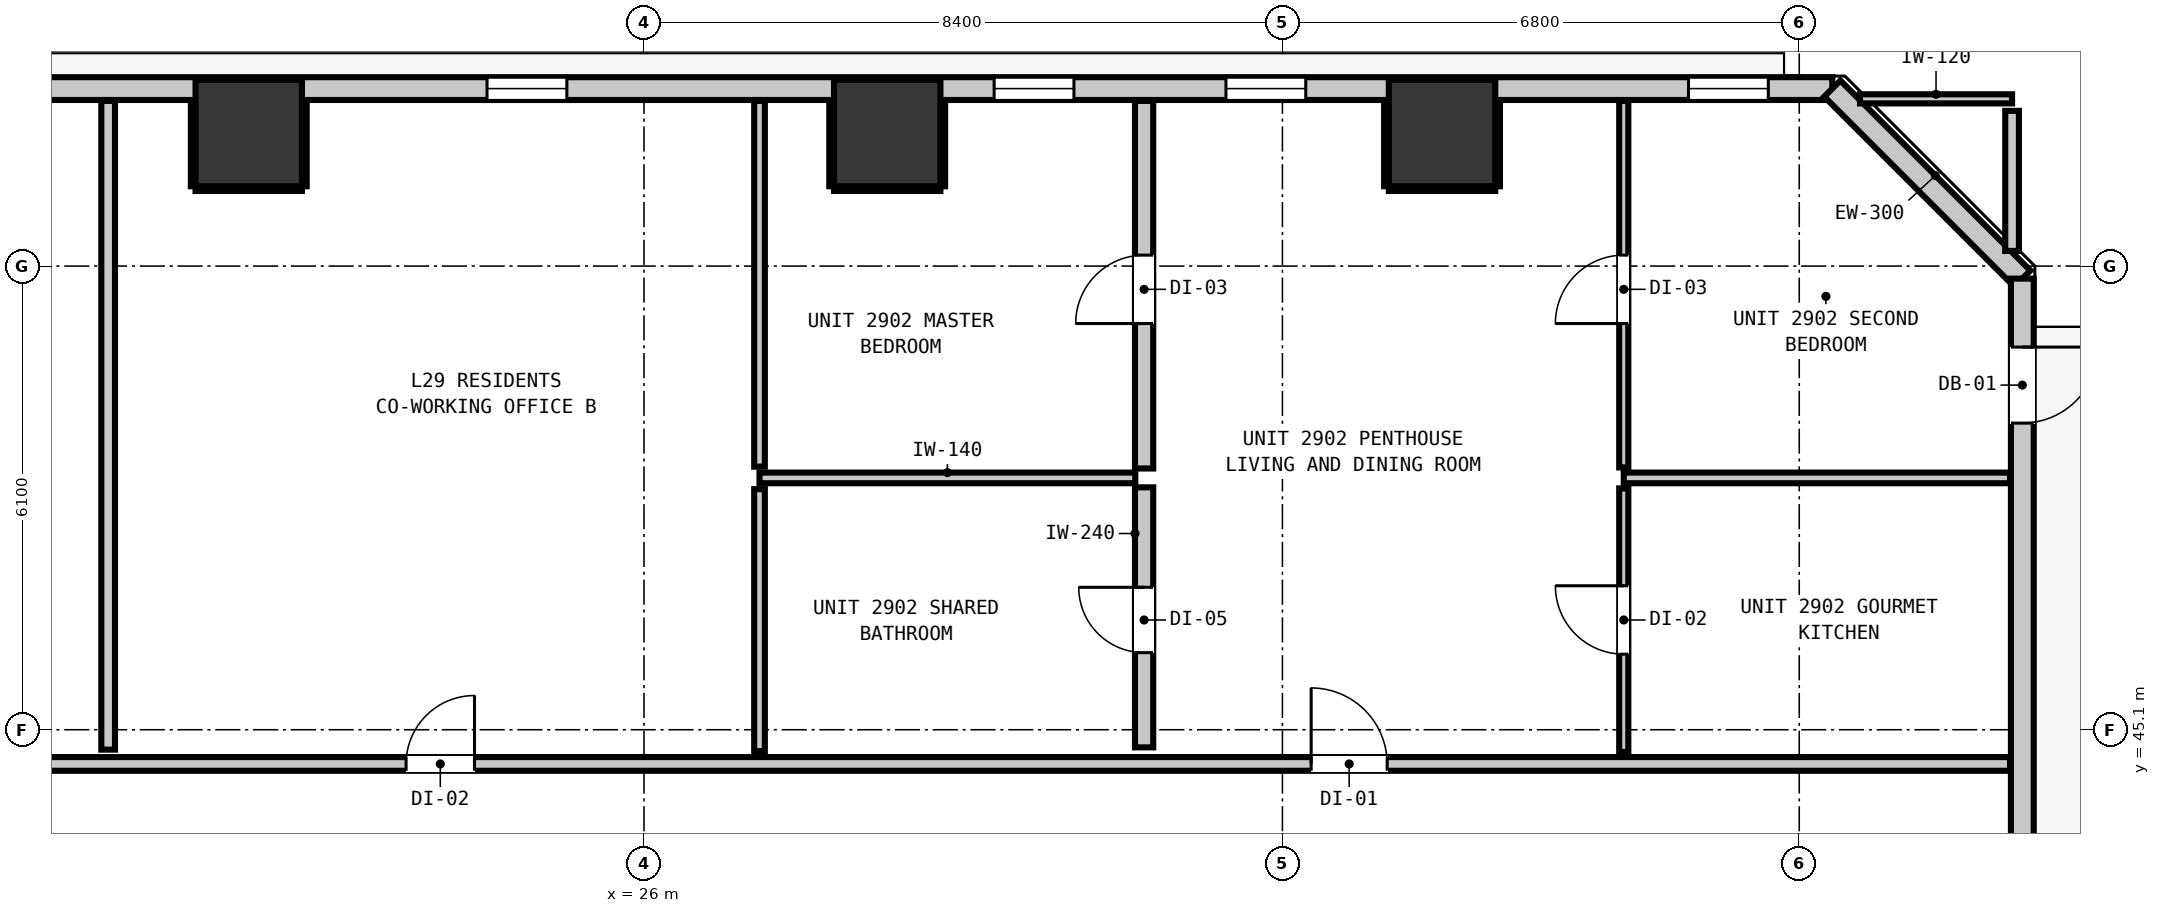
"""IFC4 building model, lengths in metres.
Left out: names, types, materials, properties, quantities, classifications, styles, units other than length and angle.
Written with IfcOpenShell. Run it as: python <this file> out.ifc"""

import sys

from ifc_helpers import new_model, si_unit, direction, frame, frame_2d, origin, origin_2d, place, context, subcontext, project, spatial, rectangle, extrude, element, fill, save


model = new_model("IFC4")
c1 = context("Model", 3, precision=1e-05, world=origin(), true_north=direction((0.0, 1.0)))
c2 = subcontext(c1, "Body", "Model", "MODEL_VIEW")
j1 = project(units=[si_unit("LENGTHUNIT", "METRE"), si_unit("PLANEANGLEUNIT", "RADIAN")], contexts=[c1])
p1 = place(None, origin())
s1 = spatial("IfcSite", under=j1, at=p1, CompositionType="ELEMENT")
p2 = place(p1, origin())
s2 = spatial("IfcBuilding", under=s1, at=p2, CompositionType="ELEMENT")
p3 = place(p2, frame((0.0, 0.0, 102.76)))
s3 = spatial("IfcBuildingStorey", under=s2, at=p3, CompositionType="ELEMENT", Elevation=102.76)
for number, where, z_axis, x_axis in (
    (1, (20.8, 52.95, 0.0), (0.0, 0.0, 1.0), (1.0, 0.0, 0.0)),
    (2, (29.2, 52.95, 0.0), (0.0, 0.0, 1.0), (1.0, 0.0, 0.0)),
    (3, (36.5, 52.95, 0.0), (0.0, 0.0, 1.0), (1.0, 0.0, 0.0)),
):
    element("IfcColumn", number, at=place(p3, frame(where, z_axis=z_axis, x_axis=x_axis)), inside=s3, PredefinedType="COLUMN", context=c2, shape_type="SweptSolid", body=[
        extrude(rectangle(XDim=1.4, YDim=1.4, at=origin_2d()), origin(), (0.0, 0.0, 1.0), 2.9),
    ])
p4 = place(p3, frame((4.165, 53.535, 0.0), z_axis=(0.0, 0.0, 1.0), x_axis=(1.0, 0.0, 0.0)))
e4 = element("IfcWall", 4, at=p4, inside=s3, PredefinedType="STANDARD", context=c2, shape_type="SweptSolid", body=[
    extrude(rectangle(XDim=37.47, YDim=0.3, at=frame_2d((18.735, 0.0))), origin(), (0.0, 0.0, 1.0), 2.9),
])
p5 = place(p4, frame((0.901, 0.0, 0.0)))
e5 = element("IfcOpeningElement", 5, at=p5, cuts=e4, PredefinedType="OPENING", context=c2, shape_type="SweptSolid", body=[
    extrude(rectangle(XDim=1.0, YDim=2.15, at=frame_2d((0.5, 1.075))), frame((0.0, 0.16, 0.0), z_axis=(0.0, -1.0, 0.0), x_axis=(1.0, 0.0, 0.0)), (0.0, 0.0, 1.0), 0.32),
])
p6 = place(p4, frame((4.793, 0.0, 0.85)))
e6 = element("IfcOpeningElement", 6, at=p6, cuts=e4, PredefinedType="OPENING", context=c2, shape_type="SweptSolid", body=[
    extrude(rectangle(XDim=1.05, YDim=1.65, at=frame_2d((0.525, 0.825))), frame((0.0, 0.16, 0.0), z_axis=(0.0, -1.0, 0.0), x_axis=(1.0, 0.0, 0.0)), (0.0, 0.0, 1.0), 0.32),
])
p7 = place(p4, frame((19.77, 0.0, 0.85)))
e7 = element("IfcOpeningElement", 7, at=p7, cuts=e4, PredefinedType="OPENING", context=c2, shape_type="SweptSolid", body=[
    extrude(rectangle(XDim=1.05, YDim=1.65, at=frame_2d((0.525, 0.825))), frame((0.0, 0.16, 0.0), z_axis=(0.0, -1.0, 0.0), x_axis=(1.0, 0.0, 0.0)), (0.0, 0.0, 1.0), 0.32),
])
p8 = place(p4, frame((29.492, 0.0, 0.85)))
e8 = element("IfcOpeningElement", 8, at=p8, cuts=e4, PredefinedType="OPENING", context=c2, shape_type="SweptSolid", body=[
    extrude(rectangle(XDim=1.05, YDim=1.65, at=frame_2d((0.525, 0.825))), frame((0.0, 0.16, 0.0), z_axis=(0.0, -1.0, 0.0), x_axis=(1.0, 0.0, 0.0)), (0.0, 0.0, 1.0), 0.32),
])
p9 = place(p4, frame((26.442, 0.0, 0.85)))
e9 = element("IfcOpeningElement", 9, at=p9, cuts=e4, PredefinedType="OPENING", context=c2, shape_type="SweptSolid", body=[
    extrude(rectangle(XDim=1.05, YDim=1.65, at=frame_2d((0.525, 0.825))), frame((0.0, 0.16, 0.0), z_axis=(0.0, -1.0, 0.0), x_axis=(1.0, 0.0, 0.0)), (0.0, 0.0, 1.0), 0.32),
])
p10 = place(p4, frame((35.578, 0.0, 0.85)))
e10 = element("IfcOpeningElement", 10, at=p10, cuts=e4, PredefinedType="OPENING", context=c2, shape_type="SweptSolid", body=[
    extrude(rectangle(XDim=1.05, YDim=1.65, at=frame_2d((0.525, 0.825))), frame((0.0, 0.16, 0.0), z_axis=(0.0, -1.0, 0.0), x_axis=(1.0, 0.0, 0.0)), (0.0, 0.0, 1.0), 0.32),
])
p11 = place(p3, frame((41.635, 53.535, 0.0), z_axis=(0.0, 0.0, 1.0), x_axis=(0.707106781187, -0.707106781187, 0.0)))
e11 = element("IfcWall", 11, at=p11, inside=s3, PredefinedType="STANDARD", context=c2, shape_type="SweptSolid", body=[
    extrude(rectangle(XDim=3.536, YDim=0.3, at=frame_2d((1.768, 0.0))), origin(), (0.0, 0.0, 1.0), 2.9),
])
p12 = place(p3, frame((44.135, 51.035, 0.0), z_axis=(0.0, 0.0, 1.0), x_axis=(0.0, -1.0, 0.0)))
e12 = element("IfcWall", 12, at=p12, inside=s3, PredefinedType="STANDARD", context=c2, shape_type="SweptSolid", body=[
    extrude(rectangle(XDim=34.67, YDim=0.3, at=frame_2d((17.335, 0.0))), origin(), (0.0, 0.0, 1.0), 2.9),
])
p13 = place(p12, frame((0.901, 0.0, 0.0)))
e13 = element("IfcOpeningElement", 13, at=p13, cuts=e12, PredefinedType="OPENING", context=c2, shape_type="SweptSolid", body=[
    extrude(rectangle(XDim=1.0, YDim=2.15, at=frame_2d((0.5, 1.075))), frame((0.0, 0.16, 0.0), z_axis=(0.0, -1.0, 0.0), x_axis=(1.0, 0.0, 0.0)), (0.0, 0.0, 1.0), 0.32),
])
p14 = place(p12, frame((32.608, 0.0, 0.85)))
e14 = element("IfcOpeningElement", 14, at=p14, cuts=e12, PredefinedType="OPENING", context=c2, shape_type="SweptSolid", body=[
    extrude(rectangle(XDim=1.05, YDim=1.65, at=frame_2d((0.525, 0.825))), frame((0.0, 0.16, 0.0), z_axis=(0.0, -1.0, 0.0), x_axis=(1.0, 0.0, 0.0)), (0.0, 0.0, 1.0), 0.32),
])
p15 = place(p12, frame((23.248, 0.0, 0.85)))
e15 = element("IfcOpeningElement", 15, at=p15, cuts=e12, PredefinedType="OPENING", context=c2, shape_type="SweptSolid", body=[
    extrude(rectangle(XDim=1.05, YDim=1.65, at=frame_2d((0.525, 0.825))), frame((0.0, 0.16, 0.0), z_axis=(0.0, -1.0, 0.0), x_axis=(1.0, 0.0, 0.0)), (0.0, 0.0, 1.0), 0.32),
])
p16 = place(p3, frame((1.827, 44.65, 0.0), z_axis=(0.0, 0.0, 1.0), x_axis=(1.0, 0.0, 0.0)))
e16 = element("IfcWall", 16, at=p16, inside=s3, PredefinedType="PARTITIONING", context=c2, shape_type="SweptSolid", body=[
    extrude(rectangle(XDim=42.146, YDim=0.18, at=frame_2d((21.073, 0.0))), origin(), (0.0, 0.0, 1.0), 2.9),
])
p17 = place(p16, frame((8.207, 0.0, 0.0)))
e17 = element("IfcOpeningElement", 17, at=p17, cuts=e16, PredefinedType="OPENING", context=c2, shape_type="SweptSolid", body=[
    extrude(rectangle(XDim=0.9, YDim=2.1, at=frame_2d((0.45, 1.05))), frame((0.0, 0.1, 0.0), z_axis=(0.0, -1.0, 0.0), x_axis=(1.0, 0.0, 0.0)), (0.0, 0.0, 1.0), 0.2),
])
p18 = place(p16, frame((21.043, 0.0, 0.0)))
e18 = element("IfcOpeningElement", 18, at=p18, cuts=e16, PredefinedType="OPENING", context=c2, shape_type="SweptSolid", body=[
    extrude(rectangle(XDim=0.9, YDim=2.1, at=frame_2d((0.45, 1.05))), frame((0.0, 0.1, 0.0), z_axis=(0.0, -1.0, 0.0), x_axis=(1.0, 0.0, 0.0)), (0.0, 0.0, 1.0), 0.2),
])
p19 = place(p16, frame((32.951, 0.0, 0.0)))
e19 = element("IfcOpeningElement", 19, at=p19, cuts=e16, PredefinedType="OPENING", context=c2, shape_type="SweptSolid", body=[
    extrude(rectangle(XDim=1.0, YDim=2.15, at=frame_2d((0.5, 1.075))), frame((0.0, 0.1, 0.0), z_axis=(0.0, -1.0, 0.0), x_axis=(1.0, 0.0, 0.0)), (0.0, 0.0, 1.0), 0.2),
])
p20 = place(p3, frame((27.52, 48.413, 0.0), z_axis=(0.0, 0.0, 1.0), x_axis=(1.0, 0.0, 0.0)))
e20 = element("IfcWall", 20, at=p20, inside=s3, PredefinedType="PARTITIONING", context=c2, shape_type="SweptSolid", body=[
    extrude(rectangle(XDim=4.944, YDim=0.14, at=frame_2d((2.472, 0.0))), origin(), (0.0, 0.0, 1.0), 2.9),
])
p21 = place(p3, frame((38.891, 48.413, 0.0), z_axis=(0.0, 0.0, 1.0), x_axis=(1.0, 0.0, 0.0)))
e21 = element("IfcWall", 21, at=p21, inside=s3, PredefinedType="PARTITIONING", context=c2, shape_type="SweptSolid", body=[
    extrude(rectangle(XDim=5.082, YDim=0.14, at=frame_2d((2.541, 0.0))), origin(), (0.0, 0.0, 1.0), 2.9),
])
p22 = place(p3, frame((41.999, 53.4, 0.0), z_axis=(0.0, 0.0, 1.0), x_axis=(1.0, 0.0, 0.0)))
e22 = element("IfcWall", 22, at=p22, inside=s3, PredefinedType="PARTITIONING", context=c2, shape_type="SweptSolid", body=[
    extrude(rectangle(XDim=2.001, YDim=0.12, at=frame_2d((1.0, 0.0))), origin(), (0.0, 0.0, 1.0), 2.9),
])
p23 = place(p3, frame((32.58, 44.868, 0.0), z_axis=(0.0, 0.0, 1.0), x_axis=(0.0, 1.0, 0.0)))
e23 = element("IfcWall", 23, at=p23, inside=s3, PredefinedType="PARTITIONING", context=c2, shape_type="SweptSolid", body=[
    extrude(rectangle(XDim=3.421, YDim=0.24, at=frame_2d((1.71, 0.0))), origin(), (0.0, 0.0, 1.0), 2.9),
])
p24 = place(p23, frame((1.246, 0.0, 0.0)))
e24 = element("IfcOpeningElement", 24, at=p24, cuts=e23, PredefinedType="OPENING", context=c2, shape_type="SweptSolid", body=[
    extrude(rectangle(XDim=0.86, YDim=2.02, at=frame_2d((0.43, 1.01))), frame((0.0, 0.13, 0.0), z_axis=(0.0, -1.0, 0.0), x_axis=(1.0, 0.0, 0.0)), (0.0, 0.0, 1.0), 0.26),
])
p25 = place(p3, frame((32.58, 48.537, 0.0), z_axis=(0.0, 0.0, 1.0), x_axis=(0.0, 1.0, 0.0)))
e25 = element("IfcWall", 25, at=p25, inside=s3, PredefinedType="PARTITIONING", context=c2, shape_type="SweptSolid", body=[
    extrude(rectangle(XDim=4.836, YDim=0.24, at=frame_2d((2.418, 0.0))), origin(), (0.0, 0.0, 1.0), 2.9),
])
p26 = place(p25, frame((1.907, 0.0, 0.0)))
e26 = element("IfcOpeningElement", 26, at=p26, cuts=e25, PredefinedType="OPENING", context=c2, shape_type="SweptSolid", body=[
    extrude(rectangle(XDim=0.9, YDim=2.1, at=frame_2d((0.45, 1.05))), frame((0.0, 0.13, 0.0), z_axis=(0.0, -1.0, 0.0), x_axis=(1.0, 0.0, 0.0)), (0.0, 0.0, 1.0), 0.26),
])
p27 = place(p3, frame((18.95, 44.838, 0.0), z_axis=(0.0, 0.0, 1.0), x_axis=(0.0, 1.0, 0.0)))
e27 = element("IfcWall", 27, at=p27, inside=s3, PredefinedType="PARTITIONING", context=c2, shape_type="SweptSolid", body=[
    extrude(rectangle(XDim=8.535, YDim=0.18, at=frame_2d((4.268, 0.0))), origin(), (0.0, 0.0, 1.0), 2.9),
])
p28 = place(p3, frame((44.0, 51.399, 0.0), z_axis=(0.0, 0.0, 1.0), x_axis=(0.0, 1.0, 0.0)))
e28 = element("IfcWall", 28, at=p28, inside=s3, PredefinedType="PARTITIONING", context=c2, shape_type="SweptSolid", body=[
    extrude(rectangle(XDim=1.843, YDim=0.18, at=frame_2d((0.921, 0.0))), origin(), (0.0, 0.0, 1.0), 2.9),
])
p29 = place(p3, frame((27.52, 44.818, 0.0), z_axis=(0.0, 0.0, 1.0), x_axis=(0.0, 1.0, 0.0)))
e29 = element("IfcWall", 29, at=p29, inside=s3, PredefinedType="PARTITIONING", context=c2, shape_type="SweptSolid", body=[
    extrude(rectangle(XDim=3.447, YDim=0.14, at=frame_2d((1.723, 0.0))), origin(), (0.0, 0.0, 1.0), 2.9),
])
p30 = place(p3, frame((27.52, 48.561, 0.0), z_axis=(0.0, 0.0, 1.0), x_axis=(0.0, 1.0, 0.0)))
e30 = element("IfcWall", 30, at=p30, inside=s3, PredefinedType="PARTITIONING", context=c2, shape_type="SweptSolid", body=[
    extrude(rectangle(XDim=4.812, YDim=0.14, at=frame_2d((2.406, 0.0))), origin(), (0.0, 0.0, 1.0), 2.9),
])
p31 = place(p3, frame((38.891, 44.808, 0.0), z_axis=(0.0, 0.0, 1.0), x_axis=(0.0, 1.0, 0.0)))
e31 = element("IfcWall", 31, at=p31, inside=s3, PredefinedType="PARTITIONING", context=c2, shape_type="SweptSolid", body=[
    extrude(rectangle(XDim=3.467, YDim=0.12, at=frame_2d((1.733, 0.0))), origin(), (0.0, 0.0, 1.0), 2.9),
])
p32 = place(p31, frame((1.286, 0.0, 0.0)))
e32 = element("IfcOpeningElement", 32, at=p32, cuts=e31, PredefinedType="OPENING", context=c2, shape_type="SweptSolid", body=[
    extrude(rectangle(XDim=0.9, YDim=2.1, at=frame_2d((0.45, 1.05))), frame((0.0, 0.07, 0.0), z_axis=(0.0, -1.0, 0.0), x_axis=(1.0, 0.0, 0.0)), (0.0, 0.0, 1.0), 0.14),
])
p33 = place(p3, frame((38.891, 48.551, 0.0), z_axis=(0.0, 0.0, 1.0), x_axis=(0.0, 1.0, 0.0)))
e33 = element("IfcWall", 33, at=p33, inside=s3, PredefinedType="PARTITIONING", context=c2, shape_type="SweptSolid", body=[
    extrude(rectangle(XDim=4.822, YDim=0.12, at=frame_2d((2.411, 0.0))), origin(), (0.0, 0.0, 1.0), 2.9),
])
p34 = place(p33, frame((1.893, 0.0, 0.0)))
e34 = element("IfcOpeningElement", 34, at=p34, cuts=e33, PredefinedType="OPENING", context=c2, shape_type="SweptSolid", body=[
    extrude(rectangle(XDim=0.9, YDim=2.1, at=frame_2d((0.45, 1.05))), frame((0.0, 0.07, 0.0), z_axis=(0.0, -1.0, 0.0), x_axis=(1.0, 0.0, 0.0)), (0.0, 0.0, 1.0), 0.14),
])
p35 = place(p3, frame((20.1, 52.218, 0.0), z_axis=(0.0, 0.0, 1.0), x_axis=(1.0, 0.0, 0.0)))
e35 = element("IfcWall", 35, at=p35, inside=s3, PredefinedType="PARTITIONING", context=c2, shape_type="SweptSolid", body=[
    extrude(rectangle(XDim=1.4, YDim=0.06, at=frame_2d((0.7, 0.0))), origin(), (0.0, 0.0, 1.0), 1.45),
])
for number, where, z_axis, x_axis in (
    (36, (20.068, 52.25, 0.0), (0.0, 0.0, 1.0), (0.0, 1.0, 0.0)),
    (37, (21.532, 52.25, 0.0), (0.0, 0.0, 1.0), (0.0, 1.0, 0.0)),
):
    element("IfcWall", number, at=place(p3, frame(where, z_axis=z_axis, x_axis=x_axis)), inside=s3, PredefinedType="PARTITIONING", context=c2, shape_type="SweptSolid", body=[
        extrude(rectangle(XDim=1.12, YDim=0.06, at=frame_2d((0.56, 0.0))), origin(), (0.0, 0.0, 1.0), 1.45),
    ])
p36 = place(p3, frame((28.5, 52.218, 0.0), z_axis=(0.0, 0.0, 1.0), x_axis=(1.0, 0.0, 0.0)))
e38 = element("IfcWall", 38, at=p36, inside=s3, PredefinedType="PARTITIONING", context=c2, shape_type="SweptSolid", body=[
    extrude(rectangle(XDim=1.4, YDim=0.06, at=frame_2d((0.7, 0.0))), origin(), (0.0, 0.0, 1.0), 1.45),
])
for number, where, z_axis, x_axis in (
    (39, (28.468, 52.25, 0.0), (0.0, 0.0, 1.0), (0.0, 1.0, 0.0)),
    (40, (29.932, 52.25, 0.0), (0.0, 0.0, 1.0), (0.0, 1.0, 0.0)),
):
    element("IfcWall", number, at=place(p3, frame(where, z_axis=z_axis, x_axis=x_axis)), inside=s3, PredefinedType="PARTITIONING", context=c2, shape_type="SweptSolid", body=[
        extrude(rectangle(XDim=1.12, YDim=0.06, at=frame_2d((0.56, 0.0))), origin(), (0.0, 0.0, 1.0), 1.45),
    ])
p37 = place(p3, frame((35.8, 52.218, 0.0), z_axis=(0.0, 0.0, 1.0), x_axis=(1.0, 0.0, 0.0)))
e41 = element("IfcWall", 41, at=p37, inside=s3, PredefinedType="PARTITIONING", context=c2, shape_type="SweptSolid", body=[
    extrude(rectangle(XDim=1.4, YDim=0.06, at=frame_2d((0.7, 0.0))), origin(), (0.0, 0.0, 1.0), 1.45),
])
for number, where, z_axis, x_axis in (
    (42, (35.768, 52.25, 0.0), (0.0, 0.0, 1.0), (0.0, 1.0, 0.0)),
    (43, (37.232, 52.25, 0.0), (0.0, 0.0, 1.0), (0.0, 1.0, 0.0)),
):
    element("IfcWall", number, at=place(p3, frame(where, z_axis=z_axis, x_axis=x_axis)), inside=s3, PredefinedType="PARTITIONING", context=c2, shape_type="SweptSolid", body=[
        extrude(rectangle(XDim=1.12, YDim=0.06, at=frame_2d((0.56, 0.0))), origin(), (0.0, 0.0, 1.0), 1.45),
    ])
p38 = place(p13, origin())
e44 = element("IfcDoor", 44, at=p38, inside=s3, OperationType="SINGLE_SWING_LEFT", PredefinedType="DOOR", context=c2, shape_type="SweptSolid", body=[
    extrude(rectangle(XDim=1.0, YDim=2.15, at=frame_2d((0.5, 1.075))), frame((0.0, 0.025, 0.0), z_axis=(0.0, -1.0, 0.0), x_axis=(1.0, 0.0, 0.0)), (0.0, 0.0, 1.0), 0.05),
])
fill(e13, e44)
p39 = place(p7, origin())
e45 = element("IfcWindow", 45, at=p39, inside=s3, PartitioningType="SINGLE_PANEL", PredefinedType="WINDOW", context=c2, shape_type="SweptSolid", body=[
    extrude(rectangle(XDim=1.05, YDim=1.65, at=frame_2d((0.525, 0.825))), frame((0.0, 0.03, 0.0), z_axis=(0.0, -1.0, 0.0), x_axis=(1.0, 0.0, 0.0)), (0.0, 0.0, 1.0), 0.06),
])
fill(e7, e45)
p40 = place(p8, origin())
e46 = element("IfcWindow", 46, at=p40, inside=s3, PartitioningType="SINGLE_PANEL", PredefinedType="WINDOW", context=c2, shape_type="SweptSolid", body=[
    extrude(rectangle(XDim=1.05, YDim=1.65, at=frame_2d((0.525, 0.825))), frame((0.0, 0.03, 0.0), z_axis=(0.0, -1.0, 0.0), x_axis=(1.0, 0.0, 0.0)), (0.0, 0.0, 1.0), 0.06),
])
fill(e8, e46)
p41 = place(p9, origin())
e47 = element("IfcWindow", 47, at=p41, inside=s3, PartitioningType="SINGLE_PANEL", PredefinedType="WINDOW", context=c2, shape_type="SweptSolid", body=[
    extrude(rectangle(XDim=1.05, YDim=1.65, at=frame_2d((0.525, 0.825))), frame((0.0, 0.03, 0.0), z_axis=(0.0, -1.0, 0.0), x_axis=(1.0, 0.0, 0.0)), (0.0, 0.0, 1.0), 0.06),
])
fill(e9, e47)
p42 = place(p10, origin())
e48 = element("IfcWindow", 48, at=p42, inside=s3, PartitioningType="SINGLE_PANEL", PredefinedType="WINDOW", context=c2, shape_type="SweptSolid", body=[
    extrude(rectangle(XDim=1.05, YDim=1.65, at=frame_2d((0.525, 0.825))), frame((0.0, 0.03, 0.0), z_axis=(0.0, -1.0, 0.0), x_axis=(1.0, 0.0, 0.0)), (0.0, 0.0, 1.0), 0.06),
])
fill(e10, e48)
p43 = place(p18, origin())
e49 = element("IfcDoor", 49, at=p43, inside=s3, OperationType="SINGLE_SWING_RIGHT", PredefinedType="DOOR", context=c2, shape_type="SweptSolid", body=[
    extrude(rectangle(XDim=0.9, YDim=2.1, at=frame_2d((0.45, 1.05))), frame((0.0, 0.025, 0.0), z_axis=(0.0, -1.0, 0.0), x_axis=(1.0, 0.0, 0.0)), (0.0, 0.0, 1.0), 0.05),
])
fill(e18, e49)
p44 = place(p19, origin())
e50 = element("IfcDoor", 50, at=p44, inside=s3, OperationType="SINGLE_SWING_LEFT", PredefinedType="DOOR", context=c2, shape_type="SweptSolid", body=[
    extrude(rectangle(XDim=1.0, YDim=2.15, at=frame_2d((0.5, 1.075))), frame((0.0, 0.025, 0.0), z_axis=(0.0, -1.0, 0.0), x_axis=(1.0, 0.0, 0.0)), (0.0, 0.0, 1.0), 0.05),
])
fill(e19, e50)
p45 = place(p24, origin())
e51 = element("IfcDoor", 51, at=p45, inside=s3, OperationType="SINGLE_SWING_RIGHT", PredefinedType="DOOR", context=c2, shape_type="SweptSolid", body=[
    extrude(rectangle(XDim=0.86, YDim=2.02, at=frame_2d((0.43, 1.01))), frame((0.0, 0.025, 0.0), z_axis=(0.0, -1.0, 0.0), x_axis=(1.0, 0.0, 0.0)), (0.0, 0.0, 1.0), 0.05),
])
fill(e24, e51)
p46 = place(p26, origin())
e52 = element("IfcDoor", 52, at=p46, inside=s3, OperationType="SINGLE_SWING_LEFT", PredefinedType="DOOR", context=c2, shape_type="SweptSolid", body=[
    extrude(rectangle(XDim=0.9, YDim=2.1, at=frame_2d((0.45, 1.05))), frame((0.0, 0.025, 0.0), z_axis=(0.0, -1.0, 0.0), x_axis=(1.0, 0.0, 0.0)), (0.0, 0.0, 1.0), 0.05),
])
fill(e26, e52)
p47 = place(p32, origin())
e53 = element("IfcDoor", 53, at=p47, inside=s3, OperationType="SINGLE_SWING_RIGHT", PredefinedType="DOOR", context=c2, shape_type="SweptSolid", body=[
    extrude(rectangle(XDim=0.9, YDim=2.1, at=frame_2d((0.45, 1.05))), frame((0.0, 0.025, 0.0), z_axis=(0.0, -1.0, 0.0), x_axis=(1.0, 0.0, 0.0)), (0.0, 0.0, 1.0), 0.05),
])
fill(e32, e53)
p48 = place(p34, origin())
e54 = element("IfcDoor", 54, at=p48, inside=s3, OperationType="SINGLE_SWING_LEFT", PredefinedType="DOOR", context=c2, shape_type="SweptSolid", body=[
    extrude(rectangle(XDim=0.9, YDim=2.1, at=frame_2d((0.45, 1.05))), frame((0.0, 0.025, 0.0), z_axis=(0.0, -1.0, 0.0), x_axis=(1.0, 0.0, 0.0)), (0.0, 0.0, 1.0), 0.05),
])
fill(e34, e54)
save(model, sys.argv[1])
